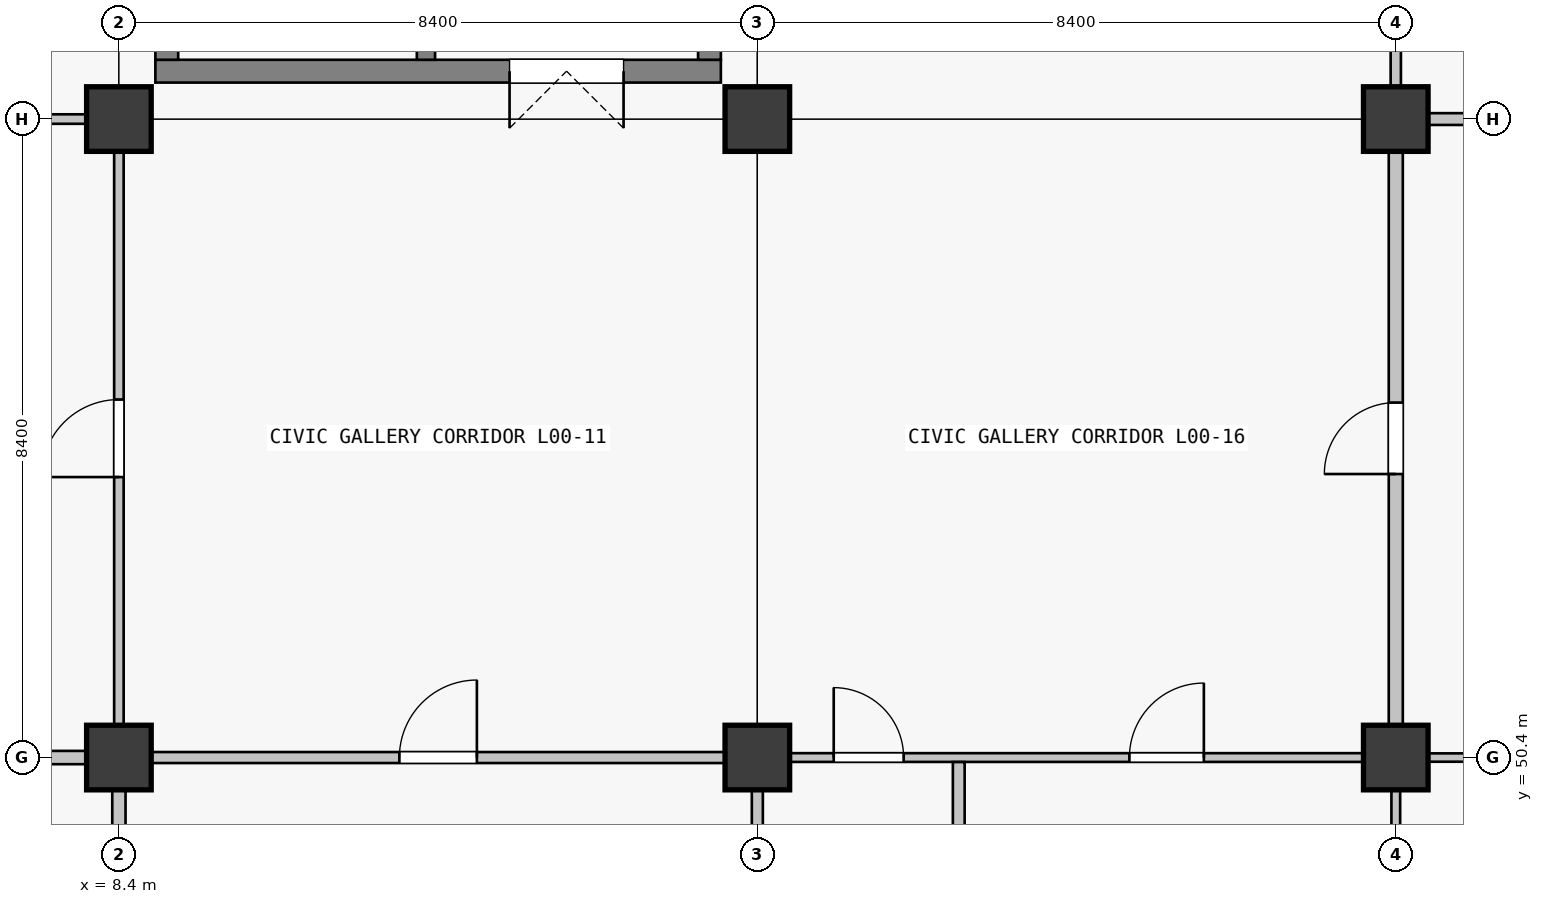
"""IFC4 building model, lengths in metres.
Left out: names, types, materials, properties, quantities, classifications, styles, units other than length and angle.
Written with IfcOpenShell. Run it as: python <this file> out.ifc"""

import sys

from ifc_helpers import new_model, si_unit, direction, frame, frame_2d, origin, origin_2d, place, context, subcontext, project, spatial, rectangle, extrude, element, fill, save


model = new_model("IFC4")
c1 = context("Model", 3, precision=1e-05, world=origin(), true_north=direction((0.0, 1.0)))
c2 = subcontext(c1, "Body", "Model", "MODEL_VIEW")
j1 = project(units=[si_unit("LENGTHUNIT", "METRE"), si_unit("PLANEANGLEUNIT", "RADIAN")], contexts=[c1])
p1 = place(None, origin())
s1 = spatial("IfcSite", under=j1, at=p1, CompositionType="ELEMENT")
p2 = place(p1, origin())
s2 = spatial("IfcBuilding", under=s1, at=p2, CompositionType="ELEMENT")
p3 = place(p2, origin())
s3 = spatial("IfcBuildingStorey", under=s2, at=p3, CompositionType="ELEMENT", Elevation=0.0)
for number, where, z_axis, x_axis in (
    (1, (8.4, 50.4, 0.0), (0.0, 0.0, 1.0), (1.0, 0.0, 0.0)),
    (2, (8.4, 58.8, 0.0), (0.0, 0.0, 1.0), (1.0, 0.0, 0.0)),
    (3, (16.8, 50.4, 0.0), (0.0, 0.0, 1.0), (1.0, 0.0, 0.0)),
    (4, (16.8, 58.8, 0.0), (0.0, 0.0, 1.0), (1.0, 0.0, 0.0)),
    (5, (25.2, 50.4, 0.0), (0.0, 0.0, 1.0), (1.0, 0.0, 0.0)),
    (6, (25.2, 58.8, 0.0), (0.0, 0.0, 1.0), (1.0, 0.0, 0.0)),
):
    element("IfcColumn", number, at=place(p3, frame(where, z_axis=z_axis, x_axis=x_axis)), inside=s3, PredefinedType="COLUMN", context=c2, shape_type="SweptSolid", body=[
        extrude(rectangle(XDim=0.85, YDim=0.85, at=origin_2d()), origin(), (0.0, 0.0, 1.0), 5.76),
    ])
p4 = place(p3, frame((16.32, 59.43, 0.0), z_axis=(0.0, 0.0, 1.0), x_axis=(-1.0, 0.0, 0.0)))
e7 = element("IfcWall", 7, at=p4, inside=s3, PredefinedType="SHEAR", context=c2, shape_type="SweptSolid", body=[
    extrude(rectangle(XDim=7.44, YDim=0.3, at=frame_2d((3.72, 0.0))), origin(), (0.0, 0.0, 1.0), 5.76),
])
p5 = place(p4, frame((1.28, 0.0, 0.0)))
e8 = element("IfcOpeningElement", 8, at=p5, cuts=e7, PredefinedType="OPENING", context=c2, shape_type="SweptSolid", body=[
    extrude(rectangle(XDim=1.5, YDim=2.15, at=frame_2d((0.75, 1.075))), frame((0.0, 0.15, 0.0), z_axis=(0.0, -1.0, 0.0), x_axis=(1.0, 0.0, 0.0)), (0.0, 0.0, 1.0), 0.3),
])
p6 = place(p3, frame((9.03, 59.58, 0.0), z_axis=(0.0, 0.0, 1.0), x_axis=(0.0, 1.0, 0.0)))
e9 = element("IfcWall", 9, at=p6, inside=s3, PredefinedType="SHEAR", context=c2, shape_type="SweptSolid", body=[
    extrude(rectangle(XDim=6.84, YDim=0.3, at=frame_2d((3.42, 0.0))), origin(), (0.0, 0.0, 1.0), 5.76),
])
p7 = place(p6, frame((0.12, 0.0, 0.0)))
e10 = element("IfcOpeningElement", 10, at=p7, cuts=e9, PredefinedType="OPENING", context=c2, shape_type="SweptSolid", body=[
    extrude(rectangle(XDim=1.0, YDim=2.15, at=frame_2d((0.5, 1.075))), frame((0.0, 0.15, 0.0), z_axis=(0.0, -1.0, 0.0), x_axis=(1.0, 0.0, 0.0)), (0.0, 0.0, 1.0), 0.3),
])
p8 = place(p3, frame((16.17, 66.42, 0.0), z_axis=(0.0, 0.0, 1.0), x_axis=(0.0, -1.0, 0.0)))
e11 = element("IfcWall", 11, at=p8, inside=s3, PredefinedType="SHEAR", context=c2, shape_type="SweptSolid", body=[
    extrude(rectangle(XDim=6.84, YDim=0.3, at=frame_2d((3.42, 0.0))), origin(), (0.0, 0.0, 1.0), 5.76),
])
p9 = place(p3, frame((12.44, 59.58, 0.0), z_axis=(0.0, 0.0, 1.0), x_axis=(0.0, 1.0, 0.0)))
e12 = element("IfcWall", 12, at=p9, inside=s3, PredefinedType="SHEAR", context=c2, shape_type="SweptSolid", body=[
    extrude(rectangle(XDim=6.84, YDim=0.24, at=frame_2d((3.42, 0.0))), origin(), (0.0, 0.0, 1.0), 5.76),
])
p10 = place(p9, frame((0.12, 0.0, 0.0)))
e13 = element("IfcOpeningElement", 13, at=p10, cuts=e12, PredefinedType="OPENING", context=c2, shape_type="SweptSolid", body=[
    extrude(rectangle(XDim=1.0, YDim=2.15, at=frame_2d((0.5, 1.075))), frame((0.0, 0.12, 0.0), z_axis=(0.0, -1.0, 0.0), x_axis=(1.0, 0.0, 0.0)), (0.0, 0.0, 1.0), 0.24),
])
p11 = place(p3, frame((0.327, 50.4, 0.0), z_axis=(0.0, 0.0, 1.0), x_axis=(1.0, 0.0, 0.0)))
e14 = element("IfcWall", 14, at=p11, inside=s3, PredefinedType="PARTITIONING", context=c2, shape_type="SweptSolid", body=[
    extrude(rectangle(XDim=7.646, YDim=0.175, at=frame_2d((3.823, 0.0))), origin(), (0.0, 0.0, 1.0), 3.66),
])
p12 = place(p11, frame((3.318, 0.0, 0.0)))
e15 = element("IfcOpeningElement", 15, at=p12, cuts=e14, PredefinedType="OPENING", context=c2, shape_type="SweptSolid", body=[
    extrude(rectangle(XDim=1.01, YDim=2.12, at=frame_2d((0.505, 1.06))), frame((0.0, 0.087, 0.0), z_axis=(0.0, -1.0, 0.0), x_axis=(1.0, 0.0, 0.0)), (0.0, 0.0, 1.0), 0.175),
])
p13 = place(p3, frame((0.302, 58.8, 0.0), z_axis=(0.0, 0.0, 1.0), x_axis=(1.0, 0.0, 0.0)))
e16 = element("IfcWall", 16, at=p13, inside=s3, PredefinedType="PARTITIONING", context=c2, shape_type="SweptSolid", body=[
    extrude(rectangle(XDim=7.671, YDim=0.125, at=frame_2d((3.835, 0.0))), origin(), (0.0, 0.0, 1.0), 3.66),
])
p14 = place(p13, frame((3.316, 0.0, 0.0)))
e17 = element("IfcOpeningElement", 17, at=p14, cuts=e16, PredefinedType="OPENING", context=c2, shape_type="SweptSolid", body=[
    extrude(rectangle(XDim=1.04, YDim=2.2, at=frame_2d((0.52, 1.1))), frame((0.0, 0.062, 0.0), z_axis=(0.0, -1.0, 0.0), x_axis=(1.0, 0.0, 0.0)), (0.0, 0.0, 1.0), 0.125),
])
p15 = place(p3, frame((8.827, 50.4, 0.0), z_axis=(0.0, 0.0, 1.0), x_axis=(1.0, 0.0, 0.0)))
e18 = element("IfcWall", 18, at=p15, inside=s3, PredefinedType="PARTITIONING", context=c2, shape_type="SweptSolid", body=[
    extrude(rectangle(XDim=7.546, YDim=0.145, at=frame_2d((3.773, 0.0))), origin(), (0.0, 0.0, 1.0), 3.66),
])
p16 = place(p15, frame((3.263, 0.0, 0.0)))
e19 = element("IfcOpeningElement", 19, at=p16, cuts=e18, PredefinedType="OPENING", context=c2, shape_type="SweptSolid", body=[
    extrude(rectangle(XDim=1.02, YDim=2.2, at=frame_2d((0.51, 1.1))), frame((0.0, 0.073, 0.0), z_axis=(0.0, -1.0, 0.0), x_axis=(1.0, 0.0, 0.0)), (0.0, 0.0, 1.0), 0.145),
])
p17 = place(p3, frame((17.227, 50.4, 0.0), z_axis=(0.0, 0.0, 1.0), x_axis=(1.0, 0.0, 0.0)))
e20 = element("IfcWall", 20, at=p17, inside=s3, PredefinedType="PARTITIONING", context=c2, shape_type="SweptSolid", body=[
    extrude(rectangle(XDim=7.546, YDim=0.115, at=frame_2d((3.773, 0.0))), origin(), (0.0, 0.0, 1.0), 3.66),
])
p18 = place(p17, frame((0.578, 0.0, 0.0)))
e21 = element("IfcOpeningElement", 21, at=p18, cuts=e20, PredefinedType="OPENING", context=c2, shape_type="SweptSolid", body=[
    extrude(rectangle(XDim=0.92, YDim=2.1, at=frame_2d((0.46, 1.05))), frame((0.0, 0.058, 0.0), z_axis=(0.0, -1.0, 0.0), x_axis=(1.0, 0.0, 0.0)), (0.0, 0.0, 1.0), 0.115),
])
p19 = place(p17, frame((4.468, 0.0, 0.0)))
e22 = element("IfcOpeningElement", 22, at=p19, cuts=e20, PredefinedType="OPENING", context=c2, shape_type="SweptSolid", body=[
    extrude(rectangle(XDim=0.98, YDim=2.08, at=frame_2d((0.49, 1.04))), frame((0.0, 0.058, 0.0), z_axis=(0.0, -1.0, 0.0), x_axis=(1.0, 0.0, 0.0)), (0.0, 0.0, 1.0), 0.115),
])
p20 = place(p3, frame((25.627, 50.4, 0.0), z_axis=(0.0, 0.0, 1.0), x_axis=(1.0, 0.0, 0.0)))
e23 = element("IfcWall", 23, at=p20, inside=s3, PredefinedType="MOVABLE", context=c2, shape_type="SweptSolid", body=[
    extrude(rectangle(XDim=7.546, YDim=0.11, at=frame_2d((3.773, 0.0))), origin(), (0.0, 0.0, 1.0), 3.66),
])
p21 = place(p20, frame((3.233, 0.0, 0.0)))
e24 = element("IfcOpeningElement", 24, at=p21, cuts=e23, PredefinedType="OPENING", context=c2, shape_type="SweptSolid", body=[
    extrude(rectangle(XDim=1.08, YDim=2.25, at=frame_2d((0.54, 1.125))), frame((0.0, 0.055, 0.0), z_axis=(0.0, -1.0, 0.0), x_axis=(1.0, 0.0, 0.0)), (0.0, 0.0, 1.0), 0.11),
])
p22 = place(p3, frame((25.627, 58.8, 0.0), z_axis=(0.0, 0.0, 1.0), x_axis=(1.0, 0.0, 0.0)))
e25 = element("IfcWall", 25, at=p22, inside=s3, PredefinedType="PARTITIONING", context=c2, shape_type="SweptSolid", body=[
    extrude(rectangle(XDim=7.546, YDim=0.155, at=frame_2d((3.773, 0.0))), origin(), (0.0, 0.0, 1.0), 3.66),
])
p23 = place(p22, frame((3.243, 0.0, 0.0)))
e26 = element("IfcOpeningElement", 26, at=p23, cuts=e25, PredefinedType="OPENING", context=c2, shape_type="SweptSolid", body=[
    extrude(rectangle(XDim=1.06, YDim=2.25, at=frame_2d((0.53, 1.125))), frame((0.0, 0.078, 0.0), z_axis=(0.0, -1.0, 0.0), x_axis=(1.0, 0.0, 0.0)), (0.0, 0.0, 1.0), 0.155),
])
p24 = place(p3, frame((8.4, 42.427, 0.0), z_axis=(0.0, 0.0, 1.0), x_axis=(0.0, 1.0, 0.0)))
e27 = element("IfcWall", 27, at=p24, inside=s3, PredefinedType="PARTITIONING", context=c2, shape_type="SweptSolid", body=[
    extrude(rectangle(XDim=7.546, YDim=0.175, at=frame_2d((3.773, 0.0))), origin(), (0.0, 0.0, 1.0), 3.66),
])
p25 = place(p24, frame((3.303, 0.0, 0.0)))
e28 = element("IfcOpeningElement", 28, at=p25, cuts=e27, PredefinedType="OPENING", context=c2, shape_type="SweptSolid", body=[
    extrude(rectangle(XDim=0.94, YDim=2.15, at=frame_2d((0.47, 1.075))), frame((0.0, 0.087, 0.0), z_axis=(0.0, -1.0, 0.0), x_axis=(1.0, 0.0, 0.0)), (0.0, 0.0, 1.0), 0.175),
])
p26 = place(p3, frame((8.4, 50.827, 0.0), z_axis=(0.0, 0.0, 1.0), x_axis=(0.0, 1.0, 0.0)))
e29 = element("IfcWall", 29, at=p26, inside=s3, PredefinedType="PARTITIONING", context=c2, shape_type="SweptSolid", body=[
    extrude(rectangle(XDim=7.546, YDim=0.125, at=frame_2d((3.773, 0.0))), origin(), (0.0, 0.0, 1.0), 3.66),
])
p27 = place(p26, frame((3.263, 0.0, 0.0)))
e30 = element("IfcOpeningElement", 30, at=p27, cuts=e29, PredefinedType="OPENING", context=c2, shape_type="SweptSolid", body=[
    extrude(rectangle(XDim=1.02, YDim=2.2, at=frame_2d((0.51, 1.1))), frame((0.0, 0.062, 0.0), z_axis=(0.0, -1.0, 0.0), x_axis=(1.0, 0.0, 0.0)), (0.0, 0.0, 1.0), 0.125),
])
p28 = place(p3, frame((16.8, 42.427, 0.0), z_axis=(0.0, 0.0, 1.0), x_axis=(0.0, 1.0, 0.0)))
e31 = element("IfcWall", 31, at=p28, inside=s3, PredefinedType="PARTITIONING", context=c2, shape_type="SweptSolid", body=[
    extrude(rectangle(XDim=7.546, YDim=0.145, at=frame_2d((3.773, 0.0))), origin(), (0.0, 0.0, 1.0), 3.66),
])
p29 = place(p3, frame((25.2, 42.427, 0.0), z_axis=(0.0, 0.0, 1.0), x_axis=(0.0, 1.0, 0.0)))
e32 = element("IfcWall", 32, at=p29, inside=s3, PredefinedType="PARTITIONING", context=c2, shape_type="SweptSolid", body=[
    extrude(rectangle(XDim=7.546, YDim=0.115, at=frame_2d((3.773, 0.0))), origin(), (0.0, 0.0, 1.0), 3.66),
])
p30 = place(p3, frame((25.2, 50.827, 0.0), z_axis=(0.0, 0.0, 1.0), x_axis=(0.0, 1.0, 0.0)))
e33 = element("IfcWall", 33, at=p30, inside=s3, PredefinedType="PARTITIONING", context=c2, shape_type="SweptSolid", body=[
    extrude(rectangle(XDim=7.546, YDim=0.185, at=frame_2d((3.773, 0.0))), origin(), (0.0, 0.0, 1.0), 3.66),
])
p31 = place(p30, frame((3.303, 0.0, 0.0)))
e34 = element("IfcOpeningElement", 34, at=p31, cuts=e33, PredefinedType="OPENING", context=c2, shape_type="SweptSolid", body=[
    extrude(rectangle(XDim=0.94, YDim=2.15, at=frame_2d((0.47, 1.075))), frame((0.0, 0.093, 0.0), z_axis=(0.0, -1.0, 0.0), x_axis=(1.0, 0.0, 0.0)), (0.0, 0.0, 1.0), 0.185),
])
p32 = place(p3, frame((25.2, 59.227, 0.0), z_axis=(0.0, 0.0, 1.0), x_axis=(0.0, 1.0, 0.0)))
e35 = element("IfcWall", 35, at=p32, inside=s3, PredefinedType="PARTITIONING", context=c2, shape_type="SweptSolid", body=[
    extrude(rectangle(XDim=7.546, YDim=0.135, at=frame_2d((3.773, 0.0))), origin(), (0.0, 0.0, 1.0), 3.66),
])
p33 = place(p32, frame((3.313, 0.0, 0.0)))
e36 = element("IfcOpeningElement", 36, at=p33, cuts=e35, PredefinedType="OPENING", context=c2, shape_type="SweptSolid", body=[
    extrude(rectangle(XDim=0.92, YDim=2.15, at=frame_2d((0.46, 1.075))), frame((0.0, 0.067, 0.0), z_axis=(0.0, -1.0, 0.0), x_axis=(1.0, 0.0, 0.0)), (0.0, 0.0, 1.0), 0.135),
])
p34 = place(p3, frame((19.45, 42.084, 0.0), z_axis=(0.0, 0.0, 1.0), x_axis=(0.0, 1.0, 0.0)))
e37 = element("IfcWall", 37, at=p34, inside=s3, PredefinedType="PARTITIONING", context=c2, shape_type="SweptSolid", body=[
    extrude(rectangle(XDim=8.256, YDim=0.155, at=frame_2d((4.128, 0.0))), origin(), (0.0, 0.0, 1.0), 3.66),
])
p35 = place(p5, origin())
e38 = element("IfcDoor", 38, at=p35, inside=s3, OperationType="DOUBLE_DOOR_SINGLE_SWING", PredefinedType="DOOR", context=c2, shape_type="SweptSolid", body=[
    extrude(rectangle(XDim=1.5, YDim=2.15, at=frame_2d((0.75, 1.075))), frame((0.0, 0.025, 0.0), z_axis=(0.0, -1.0, 0.0), x_axis=(1.0, 0.0, 0.0)), (0.0, 0.0, 1.0), 0.05),
])
fill(e8, e38)
p36 = place(p18, origin())
e39 = element("IfcDoor", 39, at=p36, inside=s3, OperationType="SINGLE_SWING_LEFT", PredefinedType="DOOR", context=c2, shape_type="SweptSolid", body=[
    extrude(rectangle(XDim=0.92, YDim=2.1, at=frame_2d((0.46, 1.05))), frame((0.0, 0.025, 0.0), z_axis=(0.0, -1.0, 0.0), x_axis=(1.0, 0.0, 0.0)), (0.0, 0.0, 1.0), 0.05),
])
fill(e21, e39)
p37 = place(p19, origin())
e40 = element("IfcDoor", 40, at=p37, inside=s3, OperationType="SINGLE_SWING_RIGHT", PredefinedType="DOOR", context=c2, shape_type="SweptSolid", body=[
    extrude(rectangle(XDim=0.98, YDim=2.08, at=frame_2d((0.49, 1.04))), frame((0.0, 0.025, 0.0), z_axis=(0.0, -1.0, 0.0), x_axis=(1.0, 0.0, 0.0)), (0.0, 0.0, 1.0), 0.05),
])
fill(e22, e40)
p38 = place(p16, origin())
e41 = element("IfcDoor", 41, at=p38, inside=s3, OperationType="SINGLE_SWING_RIGHT", PredefinedType="DOOR", context=c2, shape_type="SweptSolid", body=[
    extrude(rectangle(XDim=1.02, YDim=2.2, at=frame_2d((0.51, 1.1))), frame((0.0, 0.025, 0.0), z_axis=(0.0, -1.0, 0.0), x_axis=(1.0, 0.0, 0.0)), (0.0, 0.0, 1.0), 0.05),
])
fill(e19, e41)
p39 = place(p27, origin())
e42 = element("IfcDoor", 42, at=p39, inside=s3, OperationType="SINGLE_SWING_LEFT", PredefinedType="DOOR", context=c2, shape_type="SweptSolid", body=[
    extrude(rectangle(XDim=1.02, YDim=2.2, at=frame_2d((0.51, 1.1))), frame((0.0, 0.025, 0.0), z_axis=(0.0, -1.0, 0.0), x_axis=(1.0, 0.0, 0.0)), (0.0, 0.0, 1.0), 0.05),
])
fill(e30, e42)
p40 = place(p31, origin())
e43 = element("IfcDoor", 43, at=p40, inside=s3, OperationType="SINGLE_SWING_LEFT", PredefinedType="DOOR", context=c2, shape_type="SweptSolid", body=[
    extrude(rectangle(XDim=0.94, YDim=2.15, at=frame_2d((0.47, 1.075))), frame((0.0, 0.025, 0.0), z_axis=(0.0, -1.0, 0.0), x_axis=(1.0, 0.0, 0.0)), (0.0, 0.0, 1.0), 0.05),
])
fill(e34, e43)
save(model, sys.argv[1])
